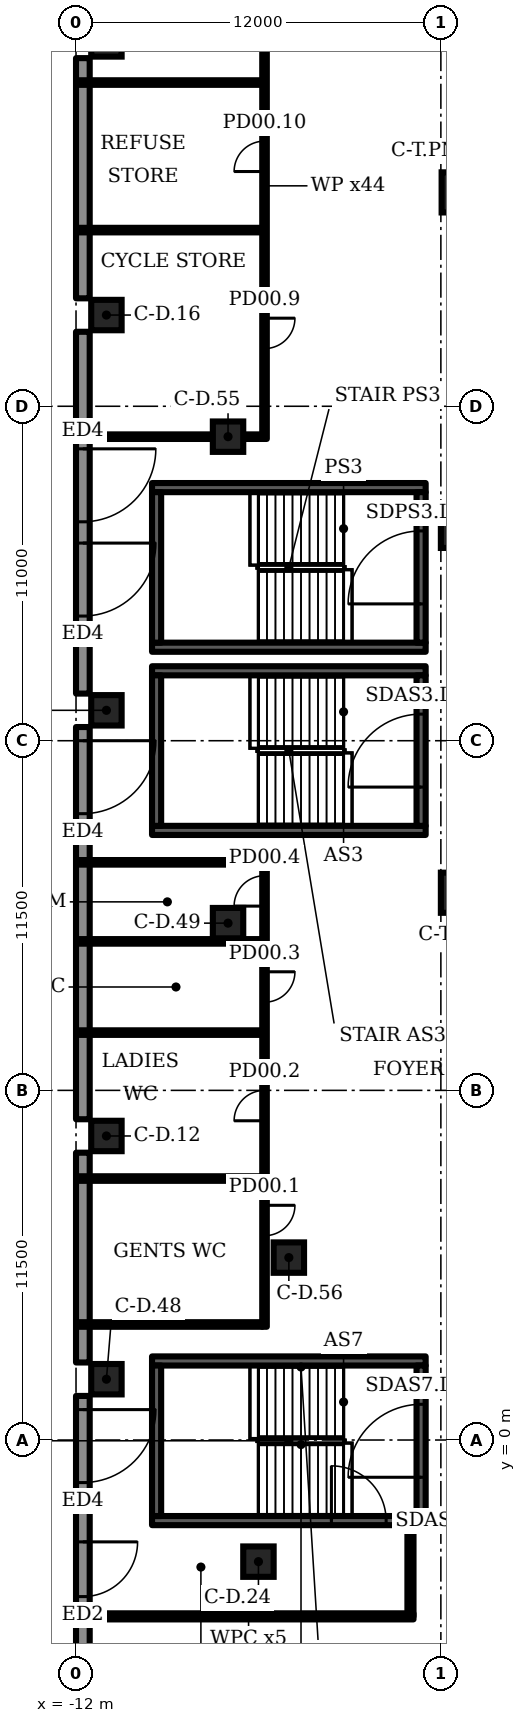
"""IFC4 building model, lengths in metres.
Left out: names, types, materials, properties, quantities, classifications, styles, units other than length and angle.
Written with IfcOpenShell. Run it as: python <this file> out.ifc"""

import sys

from ifc_helpers import new_model, si_unit, direction, frame, frame_2d, origin, origin_2d, place, context, subcontext, project, spatial, rectangle, extrude, element, fill, save


model = new_model("IFC4")
c1 = context("Model", 3, precision=1e-05, world=origin(), true_north=direction((0.0, 1.0)))
c2 = subcontext(c1, "Body", "Model", "MODEL_VIEW")
j1 = project(units=[si_unit("LENGTHUNIT", "METRE"), si_unit("PLANEANGLEUNIT", "RADIAN")], contexts=[c1])
p1 = place(None, origin())
s1 = spatial("IfcSite", under=j1, at=p1, CompositionType="ELEMENT")
p2 = place(p1, origin())
s2 = spatial("IfcBuilding", under=s1, at=p2, CompositionType="ELEMENT")
p3 = place(p2, origin())
s3 = spatial("IfcBuildingStorey", under=s2, at=p3, CompositionType="ELEMENT", Elevation=0.0)
for number, where, z_axis, x_axis in (
    (1, (0.685, 41.034, 0.0), (0.0, 0.0, 1.0), (1.0, 0.0, 0.0)),
    (2, (0.66, 30.0, 0.0), (0.0, 0.0, 1.0), (1.0, 0.0, 0.0)),
    (3, (0.66, 18.0, 0.0), (0.0, 0.0, 1.0), (1.0, 0.0, 0.0)),
):
    element("IfcColumn", number, at=place(p3, frame(where, z_axis=z_axis, x_axis=x_axis)), inside=s3, PredefinedType="COLUMN", context=c2, shape_type="SweptSolid", body=[
        extrude(rectangle(XDim=1.32, YDim=1.32, at=origin_2d()), origin(), (0.0, 0.0, 1.0), 8.0),
    ])
for number, where, z_axis, x_axis in (
    (4, (-11.0, 10.0, 0.0), (0.0, 0.0, 1.0), (1.0, 0.0, 0.0)),
    (5, (-11.0, 24.0, 0.0), (0.0, 0.0, 1.0), (1.0, 0.0, 0.0)),
    (6, (-11.0, 37.0, 0.0), (0.0, 0.0, 1.0), (1.0, 0.0, 0.0)),
    (7, (-6.0, -4.0, 0.0), (0.0, 0.0, 1.0), (1.0, 0.0, 0.0)),
    (8, (-11.0, 46.0, 0.0), (0.0, 0.0, 1.0), (1.0, 0.0, 0.0)),
    (9, (-11.0, 2.0, 0.0), (0.0, 0.0, 1.0), (1.0, 0.0, 0.0)),
    (10, (-7.0, 17.0, 0.0), (0.0, 0.0, 1.0), (1.0, 0.0, 0.0)),
    (11, (-7.0, 33.0, 0.0), (0.0, 0.0, 1.0), (1.0, 0.0, 0.0)),
    (12, (-5.0, 6.0, 0.0), (0.0, 0.0, 1.0), (1.0, 0.0, 0.0)),
):
    element("IfcColumn", number, at=place(p3, frame(where, z_axis=z_axis, x_axis=x_axis)), inside=s3, PredefinedType="COLUMN", context=c2, shape_type="SweptSolid", body=[
        extrude(rectangle(XDim=1.0, YDim=1.0, at=origin_2d()), origin(), (0.0, 0.0, 1.0), 8.0),
    ])
p4 = place(p3, frame((-11.775, 45.45, 0.0), z_axis=(0.0, 0.0, 1.0), x_axis=(0.0, -1.0, 0.0)))
e13 = element("IfcWall", 13, at=p4, inside=s3, PredefinedType="SOLIDWALL", context=c2, shape_type="SweptSolid", body=[
    extrude(rectangle(XDim=7.9, YDim=0.45, at=frame_2d((3.95, 0.0))), origin(), (0.0, 0.0, 1.0), 7.7),
])
p5 = place(p3, frame((-11.775, 36.45, 0.0), z_axis=(0.0, 0.0, 1.0), x_axis=(0.0, -1.0, 0.0)))
e14 = element("IfcWall", 14, at=p5, inside=s3, PredefinedType="SOLIDWALL", context=c2, shape_type="SweptSolid", body=[
    extrude(rectangle(XDim=11.9, YDim=0.45, at=frame_2d((5.95, 0.0))), origin(), (0.0, 0.0, 1.0), 7.7),
])
p6 = place(p5, frame((3.85, 0.0, 0.0)))
e15 = element("IfcOpeningElement", 15, at=p6, cuts=e14, PredefinedType="OPENING", context=c2, shape_type="SweptSolid", body=[
    extrude(rectangle(XDim=2.4, YDim=2.4, at=frame_2d((1.2, 1.2))), frame((0.0, 0.235, 0.0), z_axis=(0.0, -1.0, 0.0), x_axis=(1.0, 0.0, 0.0)), (0.0, 0.0, 1.0), 0.47),
])
p7 = place(p5, frame((6.95, 0.0, 0.0)))
e16 = element("IfcOpeningElement", 16, at=p7, cuts=e14, PredefinedType="OPENING", context=c2, shape_type="SweptSolid", body=[
    extrude(rectangle(XDim=2.4, YDim=2.4, at=frame_2d((1.2, 1.2))), frame((0.0, 0.235, 0.0), z_axis=(0.0, -1.0, 0.0), x_axis=(1.0, 0.0, 0.0)), (0.0, 0.0, 1.0), 0.47),
])
p8 = place(p3, frame((-11.775, 23.45, 0.0), z_axis=(0.0, 0.0, 1.0), x_axis=(0.0, -1.0, 0.0)))
e17 = element("IfcWall", 17, at=p8, inside=s3, PredefinedType="SOLIDWALL", context=c2, shape_type="SweptSolid", body=[
    extrude(rectangle(XDim=12.9, YDim=0.45, at=frame_2d((6.45, 0.0))), origin(), (0.0, 0.0, 1.0), 7.7),
])
p9 = place(p8, frame((0.45, 0.0, 0.0)))
e18 = element("IfcOpeningElement", 18, at=p9, cuts=e17, PredefinedType="OPENING", context=c2, shape_type="SweptSolid", body=[
    extrude(rectangle(XDim=2.4, YDim=2.4, at=frame_2d((1.2, 1.2))), frame((0.0, 0.235, 0.0), z_axis=(0.0, -1.0, 0.0), x_axis=(1.0, 0.0, 0.0)), (0.0, 0.0, 1.0), 0.47),
])
p10 = place(p3, frame((-11.775, 9.45, 0.0), z_axis=(0.0, 0.0, 1.0), x_axis=(0.0, -1.0, 0.0)))
e19 = element("IfcWall", 19, at=p10, inside=s3, PredefinedType="SOLIDWALL", context=c2, shape_type="SweptSolid", body=[
    extrude(rectangle(XDim=6.9, YDim=0.45, at=frame_2d((3.45, 0.0))), origin(), (0.0, 0.0, 1.0), 7.7),
])
p11 = place(p3, frame((-11.775, 1.45, 0.0), z_axis=(0.0, 0.0, 1.0), x_axis=(0.0, -1.0, 0.0)))
e20 = element("IfcWall", 20, at=p11, inside=s3, PredefinedType="SOLIDWALL", context=c2, shape_type="SweptSolid", body=[
    extrude(rectangle(XDim=9.9, YDim=0.45, at=frame_2d((4.95, 0.0))), origin(), (0.0, 0.0, 1.0), 7.7),
])
p12 = place(p11, frame((4.8, 0.0, 0.0)))
e21 = element("IfcOpeningElement", 21, at=p12, cuts=e20, PredefinedType="OPENING", context=c2, shape_type="SweptSolid", body=[
    extrude(rectangle(XDim=1.8, YDim=2.4, at=frame_2d((0.9, 1.2))), frame((0.0, 0.235, 0.0), z_axis=(0.0, -1.0, 0.0), x_axis=(1.0, 0.0, 0.0)), (0.0, 0.0, 1.0), 0.47),
])
p13 = place(p11, frame((0.45, 0.0, 0.0)))
e22 = element("IfcOpeningElement", 22, at=p13, cuts=e20, PredefinedType="OPENING", context=c2, shape_type="SweptSolid", body=[
    extrude(rectangle(XDim=2.4, YDim=2.4, at=frame_2d((1.2, 1.2))), frame((0.0, 0.235, 0.0), z_axis=(0.0, -1.0, 0.0), x_axis=(1.0, 0.0, 0.0)), (0.0, 0.0, 1.0), 0.47),
])
p14 = place(p3, frame((-11.895, 3.8, 0.0), z_axis=(0.0, 0.0, 1.0), x_axis=(1.0, 0.0, 0.0)))
e23 = element("IfcWall", 23, at=p14, inside=s3, PredefinedType="PARTITIONING", context=c2, shape_type="SweptSolid", body=[
    extrude(rectangle(XDim=6.02, YDim=0.15, at=frame_2d((3.01, 0.0))), origin(), (0.0, 0.0, 1.0), 7.7),
])
p15 = place(p3, frame((-5.8, 3.725, 0.0), z_axis=(0.0, 0.0, 1.0), x_axis=(0.0, 1.0, 0.0)))
e24 = element("IfcWall", 24, at=p15, inside=s3, PredefinedType="PARTITIONING", context=c2, shape_type="SweptSolid", body=[
    extrude(rectangle(XDim=15.35, YDim=0.15, at=frame_2d((7.675, 0.0))), origin(), (0.0, 0.0, 1.0), 7.7),
])
p16 = place(p15, frame((2.995, 0.0, 0.0)))
e25 = element("IfcOpeningElement", 25, at=p16, cuts=e24, PredefinedType="OPENING", context=c2, shape_type="SweptSolid", body=[
    extrude(rectangle(XDim=1.0, YDim=2.1, at=frame_2d((0.5, 1.05))), frame((0.0, 0.085, 0.0), z_axis=(0.0, -1.0, 0.0), x_axis=(1.0, 0.0, 0.0)), (0.0, 0.0, 1.0), 0.17),
])
p17 = place(p15, frame((6.775, 0.0, 0.0)))
e26 = element("IfcOpeningElement", 26, at=p17, cuts=e24, PredefinedType="OPENING", context=c2, shape_type="SweptSolid", body=[
    extrude(rectangle(XDim=1.0, YDim=2.1, at=frame_2d((0.5, 1.05))), frame((0.0, 0.085, 0.0), z_axis=(0.0, -1.0, 0.0), x_axis=(1.0, 0.0, 0.0)), (0.0, 0.0, 1.0), 0.17),
])
p18 = place(p15, frame((10.675, 0.0, 0.0)))
e27 = element("IfcOpeningElement", 27, at=p18, cuts=e24, PredefinedType="OPENING", context=c2, shape_type="SweptSolid", body=[
    extrude(rectangle(XDim=1.0, YDim=2.1, at=frame_2d((0.5, 1.05))), frame((0.0, 0.085, 0.0), z_axis=(0.0, -1.0, 0.0), x_axis=(1.0, 0.0, 0.0)), (0.0, 0.0, 1.0), 0.17),
])
p19 = place(p15, frame((13.835, 0.0, 0.0)))
e28 = element("IfcOpeningElement", 28, at=p19, cuts=e24, PredefinedType="OPENING", context=c2, shape_type="SweptSolid", body=[
    extrude(rectangle(XDim=1.0, YDim=2.1, at=frame_2d((0.5, 1.05))), frame((0.0, 0.085, 0.0), z_axis=(0.0, -1.0, 0.0), x_axis=(1.0, 0.0, 0.0)), (0.0, 0.0, 1.0), 0.17),
])
p20 = place(p3, frame((-5.8, 32.925, 0.0), z_axis=(0.0, 0.0, 1.0), x_axis=(0.0, 1.0, 0.0)))
e29 = element("IfcWall", 29, at=p20, inside=s3, PredefinedType="PARTITIONING", context=c2, shape_type="SweptSolid", body=[
    extrude(rectangle(XDim=16.65, YDim=0.15, at=frame_2d((8.325, 0.0))), origin(), (0.0, 0.0, 1.0), 7.7),
])
p21 = place(p20, frame((2.972, 0.0, 0.0)))
e30 = element("IfcOpeningElement", 30, at=p21, cuts=e29, PredefinedType="OPENING", context=c2, shape_type="SweptSolid", body=[
    extrude(rectangle(XDim=1.0, YDim=2.1, at=frame_2d((0.5, 1.05))), frame((0.0, 0.085, 0.0), z_axis=(0.0, -1.0, 0.0), x_axis=(1.0, 0.0, 0.0)), (0.0, 0.0, 1.0), 0.17),
])
p22 = place(p20, frame((8.796, 0.0, 0.0)))
e31 = element("IfcOpeningElement", 31, at=p22, cuts=e29, PredefinedType="OPENING", context=c2, shape_type="SweptSolid", body=[
    extrude(rectangle(XDim=1.0, YDim=2.1, at=frame_2d((0.5, 1.05))), frame((0.0, 0.085, 0.0), z_axis=(0.0, -1.0, 0.0), x_axis=(1.0, 0.0, 0.0)), (0.0, 0.0, 1.0), 0.17),
])
p23 = place(p20, frame((13.648, 0.0, 0.0)))
e32 = element("IfcOpeningElement", 32, at=p23, cuts=e29, PredefinedType="OPENING", context=c2, shape_type="SweptSolid", body=[
    extrude(rectangle(XDim=1.0, YDim=2.1, at=frame_2d((0.5, 1.05))), frame((0.0, 0.085, 0.0), z_axis=(0.0, -1.0, 0.0), x_axis=(1.0, 0.0, 0.0)), (0.0, 0.0, 1.0), 0.17),
])
for number, where, z_axis, x_axis in (
    (33, (-11.895, 8.6, 0.0), (0.0, 0.0, 1.0), (1.0, 0.0, 0.0)),
    (34, (-11.895, 13.4, 0.0), (0.0, 0.0, 1.0), (1.0, 0.0, 0.0)),
    (35, (-11.895, 16.4, 0.0), (0.0, 0.0, 1.0), (1.0, 0.0, 0.0)),
    (36, (-11.895, 19.0, 0.0), (0.0, 0.0, 1.0), (1.0, 0.0, 0.0)),
):
    element("IfcWall", number, at=place(p3, frame(where, z_axis=z_axis, x_axis=x_axis)), inside=s3, PredefinedType="PARTITIONING", context=c2, shape_type="SweptSolid", body=[
        extrude(rectangle(XDim=6.02, YDim=0.15, at=frame_2d((3.01, 0.0))), origin(), (0.0, 0.0, 1.0), 7.7),
    ])
p24 = place(p3, frame((-11.895, 33.0, 0.0), z_axis=(0.0, 0.0, 1.0), x_axis=(1.0, 0.0, 0.0)))
e37 = element("IfcWall", 37, at=p24, inside=s3, PredefinedType="PARTITIONING", context=c2, shape_type="SweptSolid", body=[
    extrude(rectangle(XDim=4.385, YDim=0.15, at=frame_2d((2.192, 0.0))), origin(), (0.0, 0.0, 1.0), 7.7),
])
p25 = place(p3, frame((-6.49, 33.0, 0.0), z_axis=(0.0, 0.0, 1.0), x_axis=(1.0, 0.0, 0.0)))
e38 = element("IfcWall", 38, at=p25, inside=s3, PredefinedType="PARTITIONING", context=c2, shape_type="SweptSolid", body=[
    extrude(rectangle(XDim=0.615, YDim=0.15, at=frame_2d((0.308, 0.0))), origin(), (0.0, 0.0, 1.0), 7.7),
])
for number, where, z_axis, x_axis in (
    (39, (-11.895, 39.794, 0.0), (0.0, 0.0, 1.0), (1.0, 0.0, 0.0)),
    (40, (-11.895, 44.647, 0.0), (0.0, 0.0, 1.0), (1.0, 0.0, 0.0)),
):
    element("IfcWall", number, at=place(p3, frame(where, z_axis=z_axis, x_axis=x_axis)), inside=s3, PredefinedType="PARTITIONING", context=c2, shape_type="SweptSolid", body=[
        extrude(rectangle(XDim=6.02, YDim=0.15, at=frame_2d((3.01, 0.0))), origin(), (0.0, 0.0, 1.0), 7.7),
    ])
p26 = place(p3, frame((-9.5, -2.65, 0.0), z_axis=(0.0, 0.0, 1.0), x_axis=(1.0, 0.0, 0.0)))
e41 = element("IfcWall", 41, at=p26, inside=s3, PredefinedType="SHEAR", context=c2, shape_type="SweptSolid", body=[
    extrude(rectangle(XDim=9.0, YDim=0.3, at=frame_2d((4.5, 0.0))), origin(), (0.0, 0.0, 1.0), 7.7),
])
p27 = place(p26, frame((5.9, 0.0, 0.0)))
e42 = element("IfcOpeningElement", 42, at=p27, cuts=e41, PredefinedType="OPENING", context=c2, shape_type="SweptSolid", body=[
    extrude(rectangle(XDim=1.8, YDim=2.1, at=frame_2d((0.9, 1.05))), frame((0.0, 0.16, 0.0), z_axis=(0.0, -1.0, 0.0), x_axis=(1.0, 0.0, 0.0)), (0.0, 0.0, 1.0), 0.32),
])
p28 = place(p3, frame((-9.5, 2.6, 0.0), z_axis=(0.0, 0.0, 1.0), x_axis=(1.0, 0.0, 0.0)))
e43 = element("IfcWall", 43, at=p28, inside=s3, PredefinedType="SHEAR", context=c2, shape_type="SweptSolid", body=[
    extrude(rectangle(XDim=9.0, YDim=0.3, at=frame_2d((4.5, 0.0))), origin(), (0.0, 0.0, 1.0), 7.7),
])
p29 = place(p3, frame((-9.35, -2.5, 0.0), z_axis=(0.0, 0.0, 1.0), x_axis=(0.0, 1.0, 0.0)))
e44 = element("IfcWall", 44, at=p29, inside=s3, PredefinedType="SHEAR", context=c2, shape_type="SweptSolid", body=[
    extrude(rectangle(XDim=4.95, YDim=0.3, at=frame_2d((2.475, 0.0))), origin(), (0.0, 0.0, 1.0), 7.7),
])
p30 = place(p3, frame((-0.65, -2.5, 0.0), z_axis=(0.0, 0.0, 1.0), x_axis=(0.0, 1.0, 0.0)))
e45 = element("IfcWall", 45, at=p30, inside=s3, PredefinedType="SHEAR", context=c2, shape_type="SweptSolid", body=[
    extrude(rectangle(XDim=4.95, YDim=0.3, at=frame_2d((2.475, 0.0))), origin(), (0.0, 0.0, 1.0), 7.7),
])
p31 = place(p30, frame((1.275, 0.0, 0.0)))
e46 = element("IfcOpeningElement", 46, at=p31, cuts=e45, PredefinedType="OPENING", context=c2, shape_type="SweptSolid", body=[
    extrude(rectangle(XDim=2.4, YDim=2.1, at=frame_2d((1.2, 1.05))), frame((0.0, 0.16, 0.0), z_axis=(0.0, -1.0, 0.0), x_axis=(1.0, 0.0, 0.0)), (0.0, 0.0, 1.0), 0.32),
])
for number, where, z_axis, x_axis in (
    (47, (-9.5, 20.05, 0.0), (0.0, 0.0, 1.0), (1.0, 0.0, 0.0)),
    (48, (-9.5, 25.3, 0.0), (0.0, 0.0, 1.0), (1.0, 0.0, 0.0)),
):
    element("IfcWall", number, at=place(p3, frame(where, z_axis=z_axis, x_axis=x_axis)), inside=s3, PredefinedType="SHEAR", context=c2, shape_type="SweptSolid", body=[
        extrude(rectangle(XDim=9.0, YDim=0.3, at=frame_2d((4.5, 0.0))), origin(), (0.0, 0.0, 1.0), 7.7),
    ])
p32 = place(p3, frame((-9.35, 20.2, 0.0), z_axis=(0.0, 0.0, 1.0), x_axis=(0.0, 1.0, 0.0)))
e49 = element("IfcWall", 49, at=p32, inside=s3, PredefinedType="SHEAR", context=c2, shape_type="SweptSolid", body=[
    extrude(rectangle(XDim=4.95, YDim=0.3, at=frame_2d((2.475, 0.0))), origin(), (0.0, 0.0, 1.0), 7.7),
])
p33 = place(p3, frame((-0.65, 20.2, 0.0), z_axis=(0.0, 0.0, 1.0), x_axis=(0.0, 1.0, 0.0)))
e50 = element("IfcWall", 50, at=p33, inside=s3, PredefinedType="SHEAR", context=c2, shape_type="SweptSolid", body=[
    extrude(rectangle(XDim=4.95, YDim=0.3, at=frame_2d((2.475, 0.0))), origin(), (0.0, 0.0, 1.0), 7.7),
])
p34 = place(p33, frame((1.275, 0.0, 0.0)))
e51 = element("IfcOpeningElement", 51, at=p34, cuts=e50, PredefinedType="OPENING", context=c2, shape_type="SweptSolid", body=[
    extrude(rectangle(XDim=2.4, YDim=2.1, at=frame_2d((1.2, 1.05))), frame((0.0, 0.16, 0.0), z_axis=(0.0, -1.0, 0.0), x_axis=(1.0, 0.0, 0.0)), (0.0, 0.0, 1.0), 0.32),
])
for number, where, z_axis, x_axis in (
    (52, (-9.5, 26.075, 0.0), (0.0, 0.0, 1.0), (1.0, 0.0, 0.0)),
    (53, (-9.5, 31.325, 0.0), (0.0, 0.0, 1.0), (1.0, 0.0, 0.0)),
):
    element("IfcWall", number, at=place(p3, frame(where, z_axis=z_axis, x_axis=x_axis)), inside=s3, PredefinedType="SHEAR", context=c2, shape_type="SweptSolid", body=[
        extrude(rectangle(XDim=9.0, YDim=0.3, at=frame_2d((4.5, 0.0))), origin(), (0.0, 0.0, 1.0), 7.7),
    ])
p35 = place(p3, frame((-9.35, 26.225, 0.0), z_axis=(0.0, 0.0, 1.0), x_axis=(0.0, 1.0, 0.0)))
e54 = element("IfcWall", 54, at=p35, inside=s3, PredefinedType="SHEAR", context=c2, shape_type="SweptSolid", body=[
    extrude(rectangle(XDim=4.95, YDim=0.3, at=frame_2d((2.475, 0.0))), origin(), (0.0, 0.0, 1.0), 7.7),
])
p36 = place(p3, frame((-0.65, 26.225, 0.0), z_axis=(0.0, 0.0, 1.0), x_axis=(0.0, 1.0, 0.0)))
e55 = element("IfcWall", 55, at=p36, inside=s3, PredefinedType="SHEAR", context=c2, shape_type="SweptSolid", body=[
    extrude(rectangle(XDim=4.95, YDim=0.3, at=frame_2d((2.475, 0.0))), origin(), (0.0, 0.0, 1.0), 7.7),
])
p37 = place(p36, frame((1.275, 0.0, 0.0)))
e56 = element("IfcOpeningElement", 56, at=p37, cuts=e55, PredefinedType="OPENING", context=c2, shape_type="SweptSolid", body=[
    extrude(rectangle(XDim=2.4, YDim=2.1, at=frame_2d((1.2, 1.05))), frame((0.0, 0.16, 0.0), z_axis=(0.0, -1.0, 0.0), x_axis=(1.0, 0.0, 0.0)), (0.0, 0.0, 1.0), 0.32),
])
p38 = place(p3, frame((-11.75, -5.8, 0.0), z_axis=(0.0, 0.0, 1.0), x_axis=(1.0, 0.0, 0.0)))
e57 = element("IfcWall", 57, at=p38, inside=s3, PredefinedType="PARTITIONING", context=c2, shape_type="SweptSolid", body=[
    extrude(rectangle(XDim=10.85, YDim=0.2, at=frame_2d((5.425, 0.0))), origin(), (0.0, 0.0, 1.0), 7.7),
])
p39 = place(p3, frame((-1.0, -5.8, 0.0), z_axis=(0.0, 0.0, 1.0), x_axis=(0.0, 1.0, 0.0)))
e58 = element("IfcWall", 58, at=p39, inside=s3, PredefinedType="PARTITIONING", context=c2, shape_type="SweptSolid", body=[
    extrude(rectangle(XDim=3.0, YDim=0.2, at=frame_2d((1.5, 0.0))), origin(), (0.0, 0.0, 1.0), 7.7),
])
p40 = place(p6, origin())
e59 = element("IfcDoor", 59, at=p40, inside=s3, OperationType="DOUBLE_DOOR_DOUBLE_SWING", PredefinedType="DOOR", context=c2, shape_type="SweptSolid", body=[
    extrude(rectangle(XDim=2.4, YDim=2.4, at=frame_2d((1.2, 1.2))), frame((0.0, 0.025, 0.0), z_axis=(0.0, -1.0, 0.0), x_axis=(1.0, 0.0, 0.0)), (0.0, 0.0, 1.0), 0.05),
])
fill(e15, e59)
p41 = place(p7, origin())
e60 = element("IfcDoor", 60, at=p41, inside=s3, OperationType="DOUBLE_DOOR_DOUBLE_SWING", PredefinedType="DOOR", context=c2, shape_type="SweptSolid", body=[
    extrude(rectangle(XDim=2.4, YDim=2.4, at=frame_2d((1.2, 1.2))), frame((0.0, 0.025, 0.0), z_axis=(0.0, -1.0, 0.0), x_axis=(1.0, 0.0, 0.0)), (0.0, 0.0, 1.0), 0.05),
])
fill(e16, e60)
p42 = place(p9, origin())
e61 = element("IfcDoor", 61, at=p42, inside=s3, OperationType="DOUBLE_DOOR_DOUBLE_SWING", PredefinedType="DOOR", context=c2, shape_type="SweptSolid", body=[
    extrude(rectangle(XDim=2.4, YDim=2.4, at=frame_2d((1.2, 1.2))), frame((0.0, 0.025, 0.0), z_axis=(0.0, -1.0, 0.0), x_axis=(1.0, 0.0, 0.0)), (0.0, 0.0, 1.0), 0.05),
])
fill(e18, e61)
p43 = place(p12, origin())
e62 = element("IfcDoor", 62, at=p43, inside=s3, OperationType="DOUBLE_DOOR_DOUBLE_SWING", PredefinedType="DOOR", context=c2, shape_type="SweptSolid", body=[
    extrude(rectangle(XDim=1.8, YDim=2.4, at=frame_2d((0.9, 1.2))), frame((0.0, 0.025, 0.0), z_axis=(0.0, -1.0, 0.0), x_axis=(1.0, 0.0, 0.0)), (0.0, 0.0, 1.0), 0.05),
])
fill(e21, e62)
p44 = place(p13, origin())
e63 = element("IfcDoor", 63, at=p44, inside=s3, OperationType="DOUBLE_DOOR_DOUBLE_SWING", PredefinedType="DOOR", context=c2, shape_type="SweptSolid", body=[
    extrude(rectangle(XDim=2.4, YDim=2.4, at=frame_2d((1.2, 1.2))), frame((0.0, 0.025, 0.0), z_axis=(0.0, -1.0, 0.0), x_axis=(1.0, 0.0, 0.0)), (0.0, 0.0, 1.0), 0.05),
])
fill(e22, e63)
p45 = place(p16, origin())
e64 = element("IfcDoor", 64, at=p45, inside=s3, OperationType="SINGLE_SWING_RIGHT", PredefinedType="DOOR", context=c2, shape_type="SweptSolid", body=[
    extrude(rectangle(XDim=1.0, YDim=2.1, at=frame_2d((0.5, 1.05))), frame((0.0, 0.025, 0.0), z_axis=(0.0, -1.0, 0.0), x_axis=(1.0, 0.0, 0.0)), (0.0, 0.0, 1.0), 0.05),
])
fill(e25, e64)
p46 = place(p17, origin())
e65 = element("IfcDoor", 65, at=p46, inside=s3, OperationType="SINGLE_SWING_LEFT", PredefinedType="DOOR", context=c2, shape_type="SweptSolid", body=[
    extrude(rectangle(XDim=1.0, YDim=2.1, at=frame_2d((0.5, 1.05))), frame((0.0, 0.025, 0.0), z_axis=(0.0, -1.0, 0.0), x_axis=(1.0, 0.0, 0.0)), (0.0, 0.0, 1.0), 0.05),
])
fill(e26, e65)
p47 = place(p18, origin())
e66 = element("IfcDoor", 66, at=p47, inside=s3, OperationType="SINGLE_SWING_RIGHT", PredefinedType="DOOR", context=c2, shape_type="SweptSolid", body=[
    extrude(rectangle(XDim=1.0, YDim=2.1, at=frame_2d((0.5, 1.05))), frame((0.0, 0.025, 0.0), z_axis=(0.0, -1.0, 0.0), x_axis=(1.0, 0.0, 0.0)), (0.0, 0.0, 1.0), 0.05),
])
fill(e27, e66)
p48 = place(p19, origin())
e67 = element("IfcDoor", 67, at=p48, inside=s3, OperationType="SINGLE_SWING_LEFT", PredefinedType="DOOR", context=c2, shape_type="SweptSolid", body=[
    extrude(rectangle(XDim=1.0, YDim=2.1, at=frame_2d((0.5, 1.05))), frame((0.0, 0.025, 0.0), z_axis=(0.0, -1.0, 0.0), x_axis=(1.0, 0.0, 0.0)), (0.0, 0.0, 1.0), 0.05),
])
fill(e28, e67)
p49 = place(p21, origin())
e68 = element("IfcDoor", 68, at=p49, inside=s3, OperationType="SINGLE_SWING_RIGHT", PredefinedType="DOOR", context=c2, shape_type="SweptSolid", body=[
    extrude(rectangle(XDim=1.0, YDim=2.1, at=frame_2d((0.5, 1.05))), frame((0.0, 0.025, 0.0), z_axis=(0.0, -1.0, 0.0), x_axis=(1.0, 0.0, 0.0)), (0.0, 0.0, 1.0), 0.05),
])
fill(e30, e68)
p50 = place(p22, origin())
e69 = element("IfcDoor", 69, at=p50, inside=s3, OperationType="SINGLE_SWING_LEFT", PredefinedType="DOOR", context=c2, shape_type="SweptSolid", body=[
    extrude(rectangle(XDim=1.0, YDim=2.1, at=frame_2d((0.5, 1.05))), frame((0.0, 0.025, 0.0), z_axis=(0.0, -1.0, 0.0), x_axis=(1.0, 0.0, 0.0)), (0.0, 0.0, 1.0), 0.05),
])
fill(e31, e69)
p51 = place(p31, origin())
e70 = element("IfcDoor", 70, at=p51, inside=s3, OperationType="DOUBLE_DOOR_SINGLE_SWING", PredefinedType="DOOR", context=c2, shape_type="SweptSolid", body=[
    extrude(rectangle(XDim=2.4, YDim=2.1, at=frame_2d((1.2, 1.05))), frame((0.0, 0.025, 0.0), z_axis=(0.0, -1.0, 0.0), x_axis=(1.0, 0.0, 0.0)), (0.0, 0.0, 1.0), 0.05),
])
fill(e46, e70)
p52 = place(p34, origin())
e71 = element("IfcDoor", 71, at=p52, inside=s3, OperationType="DOUBLE_DOOR_SINGLE_SWING", PredefinedType="DOOR", context=c2, shape_type="SweptSolid", body=[
    extrude(rectangle(XDim=2.4, YDim=2.1, at=frame_2d((1.2, 1.05))), frame((0.0, 0.025, 0.0), z_axis=(0.0, -1.0, 0.0), x_axis=(1.0, 0.0, 0.0)), (0.0, 0.0, 1.0), 0.05),
])
fill(e51, e71)
p53 = place(p37, origin())
e72 = element("IfcDoor", 72, at=p53, inside=s3, OperationType="DOUBLE_DOOR_SINGLE_SWING", PredefinedType="DOOR", context=c2, shape_type="SweptSolid", body=[
    extrude(rectangle(XDim=2.4, YDim=2.1, at=frame_2d((1.2, 1.05))), frame((0.0, 0.025, 0.0), z_axis=(0.0, -1.0, 0.0), x_axis=(1.0, 0.0, 0.0)), (0.0, 0.0, 1.0), 0.05),
])
fill(e56, e72)
p54 = place(p27, origin())
e73 = element("IfcDoor", 73, at=p54, inside=s3, OperationType="DOUBLE_DOOR_SINGLE_SWING", PredefinedType="DOOR", context=c2, shape_type="SweptSolid", body=[
    extrude(rectangle(XDim=1.8, YDim=2.1, at=frame_2d((0.9, 1.05))), frame((0.0, 0.025, 0.0), z_axis=(0.0, -1.0, 0.0), x_axis=(1.0, 0.0, 0.0)), (0.0, 0.0, 1.0), 0.05),
])
fill(e42, e73)
save(model, sys.argv[1])
